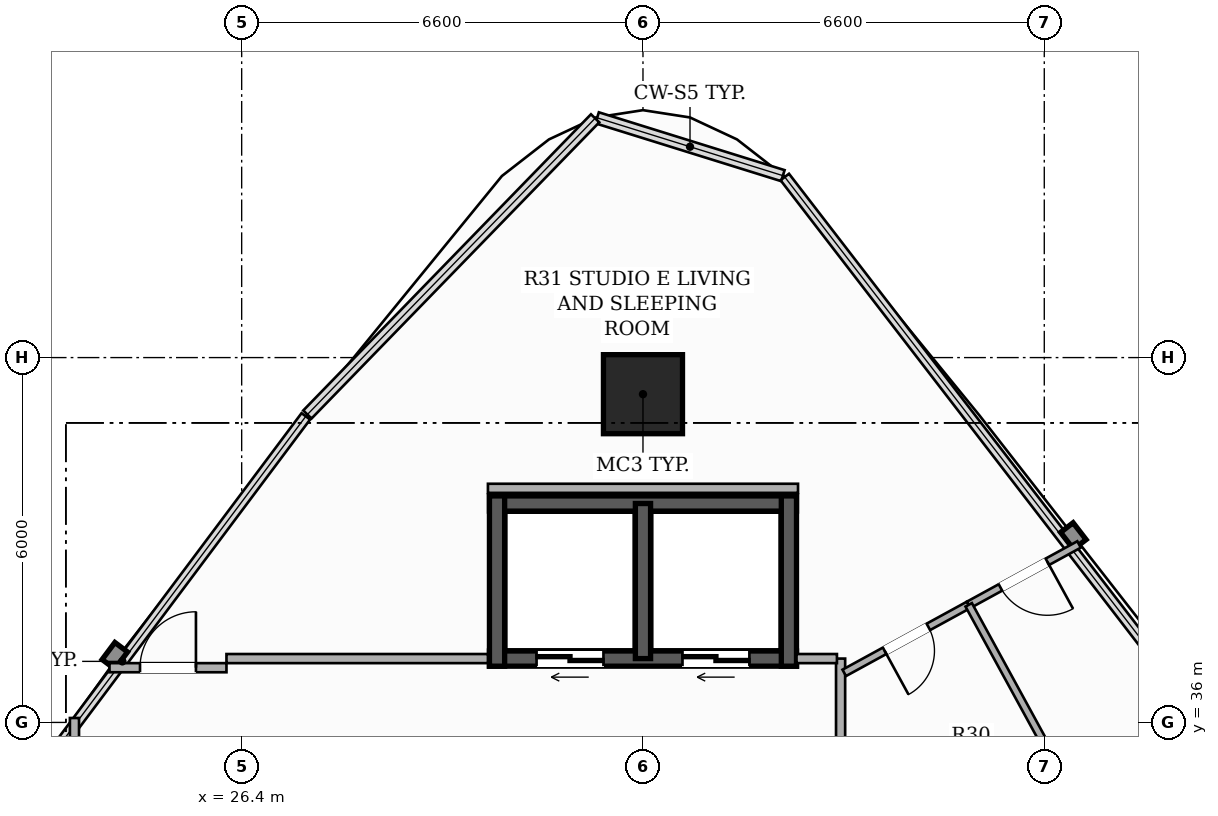
"""IFC4 building model, lengths in metres.
Left out: names, types, materials, properties, quantities, classifications, styles, units other than length and angle.
Written with IfcOpenShell. Run it as: python <this file> out.ifc"""

import sys

from ifc_helpers import new_model, si_unit, direction, frame, frame_2d, origin, origin_2d, place, context, subcontext, project, spatial, rectangle, hollow_rectangle, extrude, element, fill, save


model = new_model("IFC4")
c1 = context("Model", 3, precision=1e-05, world=origin(), true_north=direction((0.0, 1.0)))
c2 = subcontext(c1, "Body", "Model", "MODEL_VIEW")
j1 = project(units=[si_unit("LENGTHUNIT", "METRE"), si_unit("PLANEANGLEUNIT", "RADIAN")], contexts=[c1])
p1 = place(None, origin())
s1 = spatial("IfcSite", under=j1, at=p1, CompositionType="ELEMENT")
p2 = place(p1, origin())
s2 = spatial("IfcBuilding", under=s1, at=p2, CompositionType="ELEMENT")
p3 = place(p2, frame((0.0, 0.0, 219.5)))
s3 = spatial("IfcBuildingStorey", under=s2, at=p3, CompositionType="ELEMENT", Elevation=219.5)
p4 = place(p3, frame((35.525, 37.05, 0.0), z_axis=(0.0, 0.0, 1.0), x_axis=(-1.0, 0.0, 0.0)))
e1 = element("IfcWall", 1, at=p4, inside=s3, PredefinedType="SHEAR", context=c2, shape_type="SweptSolid", body=[
    extrude(rectangle(XDim=5.05, YDim=0.25, at=frame_2d((2.525, 0.0))), origin(), (0.0, 0.0, 1.0), 3.3),
])
p5 = place(p4, frame((3.175, 0.0, 0.0)))
e2 = element("IfcOpeningElement", 2, at=p5, cuts=e1, PredefinedType="OPENING", context=c2, shape_type="SweptSolid", body=[
    extrude(rectangle(XDim=1.1, YDim=2.2, at=frame_2d((0.55, 1.1))), frame((0.0, 0.135, 0.0), z_axis=(0.0, -1.0, 0.0), x_axis=(1.0, 0.0, 0.0)), (0.0, 0.0, 1.0), 0.27),
])
p6 = place(p4, frame((0.775, 0.0, 0.0)))
e3 = element("IfcOpeningElement", 3, at=p6, cuts=e1, PredefinedType="OPENING", context=c2, shape_type="SweptSolid", body=[
    extrude(rectangle(XDim=1.1, YDim=2.2, at=frame_2d((0.55, 1.1))), frame((0.0, 0.135, 0.0), z_axis=(0.0, -1.0, 0.0), x_axis=(1.0, 0.0, 0.0)), (0.0, 0.0, 1.0), 0.27),
])
p7 = place(p3, frame((30.475, 39.6, 0.0), z_axis=(0.0, 0.0, 1.0), x_axis=(1.0, 0.0, 0.0)))
e4 = element("IfcWall", 4, at=p7, inside=s3, PredefinedType="SHEAR", context=c2, shape_type="SweptSolid", body=[
    extrude(rectangle(XDim=5.05, YDim=0.25, at=frame_2d((2.525, 0.0))), origin(), (0.0, 0.0, 1.0), 3.3),
])
for number, where, z_axis, x_axis in (
    (5, (30.6, 36.925, 0.0), (0.0, 0.0, 1.0), (0.0, 1.0, 0.0)),
    (6, (35.4, 36.925, 0.0), (0.0, 0.0, 1.0), (0.0, 1.0, 0.0)),
):
    element("IfcWall", number, at=place(p3, frame(where, z_axis=z_axis, x_axis=x_axis)), inside=s3, PredefinedType="SHEAR", context=c2, shape_type="SweptSolid", body=[
        extrude(rectangle(XDim=2.8, YDim=0.25, at=frame_2d((1.4, 0.0))), origin(), (0.0, 0.0, 1.0), 3.3),
    ])
p8 = place(p3, frame((33.0, 37.05, 0.0), z_axis=(0.0, 0.0, 1.0), x_axis=(0.0, 1.0, 0.0)))
e7 = element("IfcWall", 7, at=p8, inside=s3, PredefinedType="SHEAR", context=c2, shape_type="SweptSolid", body=[
    extrude(rectangle(XDim=2.55, YDim=0.25, at=frame_2d((1.275, 0.0))), origin(), (0.0, 0.0, 1.0), 3.3),
])
p9 = place(p3, frame((33.0, 41.398, 0.0), z_axis=(0.0, 0.0, 1.0), x_axis=(1.0, 0.0, 0.0)))
e8 = element("IfcColumn", 8, at=p9, inside=s3, PredefinedType="COLUMN", context=c2, shape_type="SweptSolid", body=[
    extrude(hollow_rectangle(XDim=1.3, YDim=1.3, WallThickness=0.04, at=origin_2d()), origin(), (0.0, 0.0, 1.0), 3.3),
])
p10 = place(p3, frame((36.25, 34.76, 0.0), z_axis=(0.0, 0.0, 1.0), x_axis=(0.0, 1.0, 0.0)))
e9 = element("IfcWall", 9, at=p10, inside=s3, PredefinedType="PARTITIONING", context=c2, shape_type="SweptSolid", body=[
    extrude(rectangle(XDim=2.29, YDim=0.15, at=frame_2d((1.145, 0.0))), origin(), (0.0, 0.0, 1.0), 2.425),
])
p11 = place(p3, frame((35.525, 37.05, 0.0), z_axis=(0.0, 0.0, 1.0), x_axis=(1.0, 0.0, 0.0)))
e10 = element("IfcWall", 10, at=p11, inside=s3, PredefinedType="PARTITIONING", context=c2, shape_type="SweptSolid", body=[
    extrude(rectangle(XDim=0.665, YDim=0.15, at=frame_2d((0.333, 0.0))), origin(), (0.0, 0.0, 1.0), 2.425),
])
p12 = place(p3, frame((23.65, 23.91, 0.0), z_axis=(0.0, 0.0, 1.0), x_axis=(0.0, 1.0, 0.0)))
e11 = element("IfcWall", 11, at=p12, inside=s3, PredefinedType="PARTITIONING", context=c2, shape_type="SweptSolid", body=[
    extrude(rectangle(XDim=12.163, YDim=0.15, at=frame_2d((6.082, 0.0))), origin(), (0.0, 0.0, 1.0), 2.492),
])
p13 = place(p12, frame((5.622, 0.0, 0.0)))
e12 = element("IfcOpeningElement", 12, at=p13, cuts=e11, PredefinedType="OPENING", context=c2, shape_type="SweptSolid", body=[
    extrude(rectangle(XDim=0.92, YDim=2.15, at=frame_2d((0.46, 1.075))), frame((0.0, 0.085, 0.0), z_axis=(0.0, -1.0, 0.0), x_axis=(1.0, 0.0, 0.0)), (0.0, 0.0, 1.0), 0.17),
])
p14 = place(p3, frame((24.226, 36.9, 0.0), z_axis=(0.0, 0.0, 1.0), x_axis=(1.0, 0.0, 0.0)))
e13 = element("IfcWall", 13, at=p14, inside=s3, PredefinedType="PARTITIONING", context=c2, shape_type="SweptSolid", body=[
    extrude(rectangle(XDim=1.924, YDim=0.15, at=frame_2d((0.962, 0.0))), origin(), (0.0, 0.0, 1.0), 2.619),
])
p15 = place(p14, frame((0.502, 0.0, 0.0)))
e14 = element("IfcOpeningElement", 14, at=p15, cuts=e13, PredefinedType="OPENING", context=c2, shape_type="SweptSolid", body=[
    extrude(rectangle(XDim=0.92, YDim=2.15, at=frame_2d((0.46, 1.075))), frame((0.0, 0.085, 0.0), z_axis=(0.0, -1.0, 0.0), x_axis=(1.0, 0.0, 0.0)), (0.0, 0.0, 1.0), 0.17),
])
p16 = place(p3, frame((26.15, 37.05, 0.0), z_axis=(0.0, 0.0, 1.0), x_axis=(1.0, 0.0, 0.0)))
e15 = element("IfcWall", 15, at=p16, inside=s3, PredefinedType="PARTITIONING", context=c2, shape_type="SweptSolid", body=[
    extrude(rectangle(XDim=4.3, YDim=0.15, at=frame_2d((2.15, 0.0))), origin(), (0.0, 0.0, 1.0), 2.425),
])
p17 = place(p3, frame((30.45, 39.85, 0.0), z_axis=(0.0, 0.0, 1.0), x_axis=(1.0, 0.0, 0.0)))
e16 = element("IfcWall", 16, at=p17, inside=s3, PredefinedType="PARTITIONING", context=c2, shape_type="SweptSolid", body=[
    extrude(rectangle(XDim=5.1, YDim=0.15, at=frame_2d((2.55, 0.0))), origin(), (0.0, 0.0, 1.0), 2.492),
])
p18 = place(p3, frame((38.357, 37.934, 0.0), z_axis=(0.0, 0.0, 1.0), x_axis=(-0.877415192217, -0.479731779714, 0.0)))
e17 = element("IfcWall", 17, at=p18, inside=s3, PredefinedType="PARTITIONING", context=c2, shape_type="SweptSolid", body=[
    extrude(rectangle(XDim=2.333, YDim=0.12, at=frame_2d((1.167, 0.0))), origin(), (0.0, 0.0, 1.0), 2.425),
])
p19 = place(p18, frame((0.756, 0.0, 0.0)))
e18 = element("IfcOpeningElement", 18, at=p19, cuts=e17, PredefinedType="OPENING", context=c2, shape_type="SweptSolid", body=[
    extrude(rectangle(XDim=0.82, YDim=2.1, at=frame_2d((0.41, 1.05))), frame((0.0, 0.07, 0.0), z_axis=(0.0, -1.0, 0.0), x_axis=(1.0, 0.0, 0.0)), (0.0, 0.0, 1.0), 0.14),
])
p20 = place(p3, frame((40.172, 38.927, 0.0), z_axis=(0.0, 0.0, 1.0), x_axis=(-0.877322236726, -0.479901753432, 0.0)))
e19 = element("IfcWall", 19, at=p20, inside=s3, PredefinedType="PARTITIONING", context=c2, shape_type="SweptSolid", body=[
    extrude(rectangle(XDim=2.069, YDim=0.12, at=frame_2d((1.035, 0.0))), origin(), (0.0, 0.0, 1.0), 3.06),
])
p21 = place(p20, frame((0.594, 0.0, 0.0)))
e20 = element("IfcOpeningElement", 20, at=p21, cuts=e19, PredefinedType="OPENING", context=c2, shape_type="SweptSolid", body=[
    extrude(rectangle(XDim=0.88, YDim=2.1, at=frame_2d((0.44, 1.05))), frame((0.0, 0.07, 0.0), z_axis=(0.0, -1.0, 0.0), x_axis=(1.0, 0.0, 0.0)), (0.0, 0.0, 1.0), 0.14),
])
p22 = place(p3, frame((38.357, 37.934, 0.0), z_axis=(0.0, 0.0, 1.0), x_axis=(0.479839410825, -0.877356335715, 0.0)))
e21 = element("IfcWall", 21, at=p22, inside=s3, PredefinedType="PARTITIONING", context=c2, shape_type="SweptSolid", body=[
    extrude(rectangle(XDim=6.183, YDim=0.12, at=frame_2d((3.092, 0.0))), origin(), (0.0, 0.0, 1.0), 2.492),
])
p23 = place(p5, origin())
e22 = element("IfcDoor", 22, at=p23, inside=s3, OperationType="DOUBLE_DOOR_SLIDING", PredefinedType="DOOR", context=c2, shape_type="SweptSolid", body=[
    extrude(rectangle(XDim=1.1, YDim=2.2, at=frame_2d((0.55, 1.1))), frame((0.0, 0.025, 0.0), z_axis=(0.0, -1.0, 0.0), x_axis=(1.0, 0.0, 0.0)), (0.0, 0.0, 1.0), 0.05),
])
fill(e2, e22)
p24 = place(p6, origin())
e23 = element("IfcDoor", 23, at=p24, inside=s3, OperationType="DOUBLE_DOOR_SLIDING", PredefinedType="DOOR", context=c2, shape_type="SweptSolid", body=[
    extrude(rectangle(XDim=1.1, YDim=2.2, at=frame_2d((0.55, 1.1))), frame((0.0, 0.025, 0.0), z_axis=(0.0, -1.0, 0.0), x_axis=(1.0, 0.0, 0.0)), (0.0, 0.0, 1.0), 0.05),
])
fill(e3, e23)
p25 = place(p15, origin())
e24 = element("IfcDoor", 24, at=p25, inside=s3, OperationType="SINGLE_SWING_RIGHT", PredefinedType="DOOR", context=c2, shape_type="SweptSolid", body=[
    extrude(rectangle(XDim=0.92, YDim=2.15, at=frame_2d((0.46, 1.075))), frame((0.0, 0.025, 0.0), z_axis=(0.0, -1.0, 0.0), x_axis=(1.0, 0.0, 0.0)), (0.0, 0.0, 1.0), 0.05),
])
fill(e14, e24)
p26 = place(p19, origin())
e25 = element("IfcDoor", 25, at=p26, inside=s3, OperationType="SINGLE_SWING_RIGHT", PredefinedType="DOOR", context=c2, shape_type="SweptSolid", body=[
    extrude(rectangle(XDim=0.82, YDim=2.1, at=frame_2d((0.41, 1.05))), frame((0.0, 0.025, 0.0), z_axis=(0.0, -1.0, 0.0), x_axis=(1.0, 0.0, 0.0)), (0.0, 0.0, 1.0), 0.05),
])
fill(e18, e25)
p27 = place(p21, origin())
e26 = element("IfcDoor", 26, at=p27, inside=s3, OperationType="SINGLE_SWING_LEFT", PredefinedType="DOOR", context=c2, shape_type="SweptSolid", body=[
    extrude(rectangle(XDim=0.88, YDim=2.1, at=frame_2d((0.44, 1.05))), frame((0.0, 0.025, 0.0), z_axis=(0.0, -1.0, 0.0), x_axis=(1.0, 0.0, 0.0)), (0.0, 0.0, 1.0), 0.05),
])
fill(e20, e26)
save(model, sys.argv[1])
